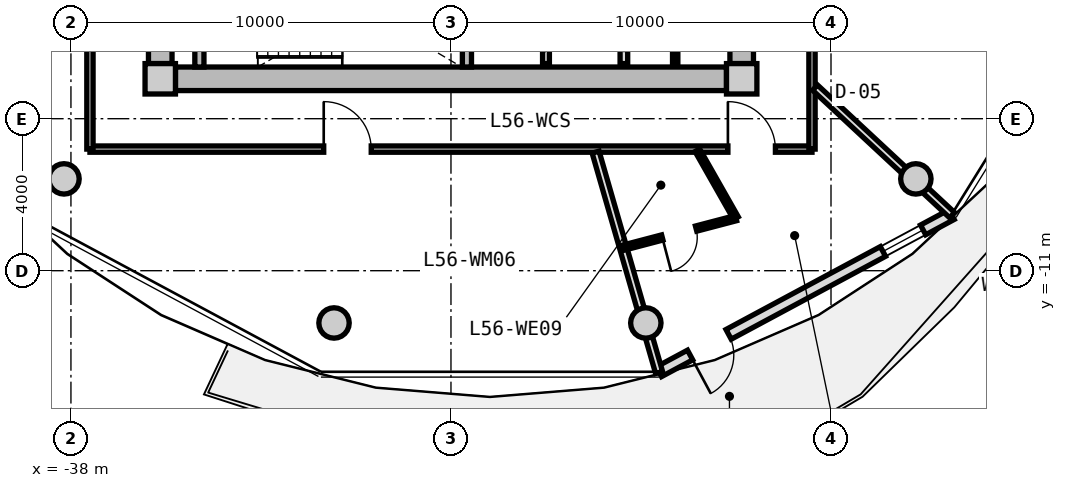
"""IFC4 building model, lengths in metres.
Left out: names, types, materials, properties, quantities, classifications, styles, units other than length and angle.
Written with IfcOpenShell. Run it as: python <this file> out.ifc"""

import sys

from ifc_helpers import new_model, si_unit, direction, frame, frame_2d, origin, origin_2d, place, context, subcontext, project, spatial, rectangle, circle, extrude, source, transform, mapped, element, fill, save


model = new_model("IFC4")
c1 = context("Model", 3, precision=1e-05, world=origin(), true_north=direction((0.0, 1.0)))
c2 = subcontext(c1, "Body", "Model", "MODEL_VIEW")
j1 = project(units=[si_unit("LENGTHUNIT", "METRE"), si_unit("PLANEANGLEUNIT", "RADIAN")], contexts=[c1])
p1 = place(None, origin())
s1 = spatial("IfcSite", under=j1, at=p1, CompositionType="ELEMENT")
p2 = place(p1, origin())
s2 = spatial("IfcBuilding", under=s1, at=p2, CompositionType="ELEMENT")
p3 = place(p2, frame((0.0, 0.0, 180.05)))
s3 = spatial("IfcBuildingStorey", under=s2, at=p3, CompositionType="ELEMENT", Elevation=180.05)
m1 = source(origin(), c2, "Body", "SweptSolid", [
    extrude(rectangle(XDim=0.8, YDim=0.8, at=origin_2d()), origin(), (0.0, 0.0, 1.0), 3.05),
])
for number, where, z_axis, x_axis in (
    (1, (-35.65, -5.95, 0.0), (0.0, 0.0, 1.0), (1.0, 0.0, 0.0)),
    (2, (-20.35, -5.95, 0.0), (0.0, 0.0, 1.0), (1.0, 0.0, 0.0)),
):
    element("IfcColumn", number, at=place(p3, frame(where, z_axis=z_axis, x_axis=x_axis)), inside=s3, PredefinedType="COLUMN", context=c2, shape_type="MappedRepresentation", body=[
        mapped(m1, transform((0.0, 0.0, 0.0), x_axis=(1.0, 0.0, 0.0), y_axis=(0.0, 1.0, 0.0), z_axis=(0.0, 0.0, 1.0), scale=1.0)),
    ])
m2 = source(origin(), c2, "Body", "SweptSolid", [
    extrude(rectangle(XDim=14.5, YDim=0.62, at=frame_2d((7.25, 0.0))), origin(), (0.0, 0.0, 1.0), 2.81),
])
p4 = place(p3, frame((-20.75, -5.95, 0.0), z_axis=(0.0, 0.0, 1.0), x_axis=(-1.0, 0.0, 0.0)))
e3 = element("IfcWall", 3, at=p4, inside=s3, PredefinedType="SHEAR", context=c2, shape_type="MappedRepresentation", body=[
    mapped(m2, transform((0.0, 0.0, 0.0), x_axis=(1.0, 0.0, 0.0), y_axis=(0.0, 1.0, 0.0), z_axis=(0.0, 0.0, 1.0), scale=1.0)),
])
m3 = source(origin(), c2, "Body", "SweptSolid", [
    extrude(rectangle(XDim=11.1, YDim=0.62, at=frame_2d((5.55, 0.0))), origin(), (0.0, 0.0, 1.0), 2.81),
])
p5 = place(p3, frame((-35.65, -5.55, 0.0), z_axis=(0.0, 0.0, 1.0), x_axis=(0.0, 1.0, 0.0)))
e4 = element("IfcWall", 4, at=p5, inside=s3, PredefinedType="SHEAR", context=c2, shape_type="MappedRepresentation", body=[
    mapped(m3, transform((0.0, 0.0, 0.0), x_axis=(1.0, 0.0, 0.0), y_axis=(0.0, 1.0, 0.0), z_axis=(0.0, 0.0, 1.0), scale=1.0)),
])
p6 = place(p5, frame((3.8, 0.0, 0.0)))
e5 = element("IfcOpeningElement", 5, at=p6, cuts=e4, PredefinedType="OPENING", context=c2, shape_type="SweptSolid", body=[
    extrude(rectangle(XDim=1.2, YDim=2.15, at=frame_2d((0.6, 1.075))), frame((0.0, 0.32, 0.0), z_axis=(0.0, -1.0, 0.0), x_axis=(1.0, 0.0, 0.0)), (0.0, 0.0, 1.0), 0.64),
])
p7 = place(p3, frame((-20.35, 5.55, 0.0), z_axis=(0.0, 0.0, 1.0), x_axis=(0.0, -1.0, 0.0)))
e6 = element("IfcWall", 6, at=p7, inside=s3, PredefinedType="SHEAR", context=c2, shape_type="MappedRepresentation", body=[
    mapped(m3, transform((0.0, 0.0, 0.0), x_axis=(1.0, 0.0, 0.0), y_axis=(0.0, 1.0, 0.0), z_axis=(0.0, 0.0, 1.0), scale=1.0)),
])
p8 = place(p7, frame((5.65, 0.0, 0.0)))
e7 = element("IfcOpeningElement", 7, at=p8, cuts=e6, PredefinedType="OPENING", context=c2, shape_type="SweptSolid", body=[
    extrude(rectangle(XDim=1.2, YDim=2.15, at=frame_2d((0.6, 1.075))), frame((0.0, 0.32, 0.0), z_axis=(0.0, -1.0, 0.0), x_axis=(1.0, 0.0, 0.0)), (0.0, 0.0, 1.0), 0.64),
])
m4 = source(origin(), c2, "Body", "SweptSolid", [
    extrude(circle(Radius=0.4, at=origin_2d()), origin(), (0.0, 0.0, 1.0), 3.05),
])
for number, where, z_axis, x_axis in (
    (8, (-38.183, -8.584, 0.0), (0.0, 0.0, 1.0), (1.0, 0.0, 0.0)),
    (9, (-31.077, -12.375, 0.0), (0.0, 0.0, 1.0), (1.0, 0.0, 0.0)),
    (10, (-22.873, -12.375, 0.0), (0.0, 0.0, 1.0), (1.0, 0.0, 0.0)),
    (11, (-15.767, -8.584, 0.0), (0.0, 0.0, 1.0), (1.0, 0.0, 0.0)),
):
    element("IfcColumn", number, at=place(p3, frame(where, z_axis=z_axis, x_axis=x_axis)), inside=s3, PredefinedType="COLUMN", context=c2, shape_type="MappedRepresentation", body=[
        mapped(m4, transform((0.0, 0.0, 0.0), x_axis=(1.0, 0.0, 0.0), y_axis=(0.0, 1.0, 0.0), z_axis=(0.0, 0.0, 1.0), scale=1.0)),
    ])
m5 = source(origin(), c2, "Body", "SweptSolid", [
    extrude(rectangle(XDim=8.742, YDim=0.29, at=frame_2d((4.371, 0.0))), origin(), (0.0, 0.0, 1.0), 2.81),
])
p9 = place(p3, frame((-14.827, -9.524, 0.0), z_axis=(0.0, 0.0, 1.0), x_axis=(-0.880998740657, -0.473118609823, 0.0)))
e12 = element("IfcWall", 12, at=p9, inside=s3, PredefinedType="SOLIDWALL", context=c2, shape_type="MappedRepresentation", body=[
    mapped(m5, transform((0.0, 0.0, 0.0), x_axis=(1.0, 0.0, 0.0), y_axis=(0.0, 1.0, 0.0), z_axis=(0.0, 0.0, 1.0), scale=1.0)),
])
p10 = place(p9, frame((6.66, 0.0, 0.0)))
e13 = element("IfcOpeningElement", 13, at=p10, cuts=e12, PredefinedType="OPENING", context=c2, shape_type="SweptSolid", body=[
    extrude(rectangle(XDim=1.15, YDim=2.25, at=frame_2d((0.575, 1.125))), frame((0.0, 0.155, 0.0), z_axis=(0.0, -1.0, 0.0), x_axis=(1.0, 0.0, 0.0)), (0.0, 0.0, 1.0), 0.31),
])
p11 = place(p9, frame((0.85, 0.0, 0.85)))
e14 = element("IfcOpeningElement", 14, at=p11, cuts=e12, PredefinedType="OPENING", context=c2, shape_type="SweptSolid", body=[
    extrude(rectangle(XDim=1.2, YDim=1.5, at=frame_2d((0.6, 0.75))), frame((0.0, 0.155, 0.0), z_axis=(0.0, -1.0, 0.0), x_axis=(1.0, 0.0, 0.0)), (0.0, 0.0, 1.0), 0.31),
])
m6 = source(origin(), c2, "Body", "SweptSolid", [
    extrude(rectangle(XDim=3.19, YDim=0.24, at=frame_2d((1.595, 0.0))), origin(), (0.0, 0.0, 1.0), 2.81),
])
for number, where, z_axis, x_axis in (
    (15, (-34.62, -5.64, 0.0), (0.0, 0.0, 1.0), (0.0, 1.0, 0.0)),
    (16, (-27.58, -5.64, 0.0), (0.0, 0.0, 1.0), (0.0, 1.0, 0.0)),
):
    element("IfcWall", number, at=place(p3, frame(where, z_axis=z_axis, x_axis=x_axis)), inside=s3, PredefinedType="PARTITIONING", context=c2, shape_type="MappedRepresentation", body=[
        mapped(m6, transform((0.0, 0.0, 0.0), x_axis=(1.0, 0.0, 0.0), y_axis=(0.0, 1.0, 0.0), z_axis=(0.0, 0.0, 1.0), scale=1.0)),
    ])
m7 = source(origin(), c2, "Body", "SweptSolid", [
    extrude(rectangle(XDim=3.8, YDim=0.2, at=frame_2d((1.9, 0.0))), origin(), (0.0, 0.0, 1.0), 2.795),
])
p12 = place(p3, frame((-23.45, -5.55, 0.0), z_axis=(0.0, 0.0, 1.0), x_axis=(0.0, 1.0, 0.0)))
e17 = element("IfcWall", 17, at=p12, inside=s3, PredefinedType="PARTITIONING", context=c2, shape_type="MappedRepresentation", body=[
    mapped(m7, transform((0.0, 0.0, 0.0), x_axis=(1.0, 0.0, 0.0), y_axis=(0.0, 1.0, 0.0), z_axis=(0.0, 0.0, 1.0), scale=1.0)),
])
m8 = source(origin(), c2, "Body", "SweptSolid", [
    extrude(rectangle(XDim=4.2, YDim=0.18, at=frame_2d((2.1, 0.0))), origin(), (0.0, 0.0, 1.0), 2.795),
])
p13 = place(p3, frame((-25.5, -5.55, 0.0), z_axis=(0.0, 0.0, 1.0), x_axis=(0.0, 1.0, 0.0)))
e18 = element("IfcWall", 18, at=p13, inside=s3, PredefinedType="PARTITIONING", context=c2, shape_type="MappedRepresentation", body=[
    mapped(m8, transform((0.0, 0.0, 0.0), x_axis=(1.0, 0.0, 0.0), y_axis=(0.0, 1.0, 0.0), z_axis=(0.0, 0.0, 1.0), scale=1.0)),
])
m9 = source(origin(), c2, "Body", "SweptSolid", [
    extrude(rectangle(XDim=3.8, YDim=0.14, at=frame_2d((1.9, 0.0))), origin(), (0.0, 0.0, 1.0), 2.795),
])
p14 = place(p3, frame((-22.1, -5.55, 0.0), z_axis=(0.0, 0.0, 1.0), x_axis=(0.0, 1.0, 0.0)))
e19 = element("IfcWall", 19, at=p14, inside=s3, PredefinedType="PARTITIONING", context=c2, shape_type="MappedRepresentation", body=[
    mapped(m9, transform((0.0, 0.0, 0.0), x_axis=(1.0, 0.0, 0.0), y_axis=(0.0, 1.0, 0.0), z_axis=(0.0, 0.0, 1.0), scale=1.0)),
])
m10 = source(origin(), c2, "Body", "SweptSolid", [
    extrude(rectangle(XDim=19.0, YDim=0.165, at=frame_2d((9.5, 0.0))), origin(), (0.0, 0.0, 1.0), 2.795),
])
p15 = place(p3, frame((-18.5, -7.8, 0.0), z_axis=(0.0, 0.0, 1.0), x_axis=(-1.0, 0.0, 0.0)))
e20 = element("IfcWall", 20, at=p15, inside=s3, PredefinedType="PARTITIONING", context=c2, shape_type="MappedRepresentation", body=[
    mapped(m10, transform((0.0, 0.0, 0.0), x_axis=(1.0, 0.0, 0.0), y_axis=(0.0, 1.0, 0.0), z_axis=(0.0, 0.0, 1.0), scale=1.0)),
])
p16 = place(p15, frame((11.598, 0.0, 0.0)))
e21 = element("IfcOpeningElement", 21, at=p16, cuts=e20, PredefinedType="OPENING", context=c2, shape_type="SweptSolid", body=[
    extrude(rectangle(XDim=1.25, YDim=2.2, at=frame_2d((0.625, 1.1))), frame((0.0, 0.093, 0.0), z_axis=(0.0, -1.0, 0.0), x_axis=(1.0, 0.0, 0.0)), (0.0, 0.0, 1.0), 0.185),
])
p17 = place(p15, frame((0.963, 0.0, 0.0)))
e22 = element("IfcOpeningElement", 22, at=p17, cuts=e20, PredefinedType="OPENING", context=c2, shape_type="SweptSolid", body=[
    extrude(rectangle(XDim=1.25, YDim=2.2, at=frame_2d((0.625, 1.1))), frame((0.0, 0.093, 0.0), z_axis=(0.0, -1.0, 0.0), x_axis=(1.0, 0.0, 0.0)), (0.0, 0.0, 1.0), 0.185),
])
m11 = source(origin(), c2, "Body", "SweptSolid", [
    extrude(rectangle(XDim=6.88, YDim=0.165, at=frame_2d((3.44, 0.0))), origin(), (0.0, 0.0, 1.0), 2.795),
])
p18 = place(p3, frame((-37.5, -7.8, 0.0), z_axis=(0.0, 0.0, 1.0), x_axis=(0.0, 1.0, 0.0)))
e23 = element("IfcWall", 23, at=p18, inside=s3, PredefinedType="PARTITIONING", context=c2, shape_type="MappedRepresentation", body=[
    mapped(m11, transform((0.0, 0.0, 0.0), x_axis=(1.0, 0.0, 0.0), y_axis=(0.0, 1.0, 0.0), z_axis=(0.0, 0.0, 1.0), scale=1.0)),
])
m12 = source(origin(), c2, "Body", "SweptSolid", [
    extrude(rectangle(XDim=7.365, YDim=0.165, at=frame_2d((3.682, 0.0))), origin(), (0.0, 0.0, 1.0), 2.795),
])
p19 = place(p3, frame((-18.5, -0.436, 0.0), z_axis=(0.0, 0.0, 1.0), x_axis=(0.0, -1.0, 0.0)))
e24 = element("IfcWall", 24, at=p19, inside=s3, PredefinedType="PARTITIONING", context=c2, shape_type="MappedRepresentation", body=[
    mapped(m12, transform((0.0, 0.0, 0.0), x_axis=(1.0, 0.0, 0.0), y_axis=(0.0, 1.0, 0.0), z_axis=(0.0, 0.0, 1.0), scale=1.0)),
])
p20 = place(p19, frame((2.433, 0.0, 0.0)))
e25 = element("IfcOpeningElement", 25, at=p20, cuts=e24, PredefinedType="OPENING", context=c2, shape_type="SweptSolid", body=[
    extrude(rectangle(XDim=1.25, YDim=2.2, at=frame_2d((0.625, 1.1))), frame((0.0, 0.093, 0.0), z_axis=(0.0, -1.0, 0.0), x_axis=(1.0, 0.0, 0.0)), (0.0, 0.0, 1.0), 0.185),
])
m13 = source(origin(), c2, "Body", "SweptSolid", [
    extrude(rectangle(XDim=6.035, YDim=0.19, at=frame_2d((3.018, 0.0))), origin(), (0.0, 0.0, 1.0), 2.345),
])
p21 = place(p3, frame((-24.194, -7.88, 0.0), z_axis=(0.0, 0.0, 1.0), x_axis=(0.276809454862, -0.960924828329, 0.0)))
e26 = element("IfcWall", 26, at=p21, inside=s3, PredefinedType="PARTITIONING", context=c2, shape_type="MappedRepresentation", body=[
    mapped(m13, transform((0.0, 0.0, 0.0), x_axis=(1.0, 0.0, 0.0), y_axis=(0.0, 1.0, 0.0), z_axis=(0.0, 0.0, 1.0), scale=1.0)),
])
m14 = source(origin(), c2, "Body", "SweptSolid", [
    extrude(rectangle(XDim=4.927, YDim=0.19, at=frame_2d((2.463, 0.0))), origin(), (0.0, 0.0, 1.0), 2.435),
])
p22 = place(p3, frame((-18.42, -6.183, 0.0), z_axis=(0.0, 0.0, 1.0), x_axis=(0.732191335987, -0.681098999783, 0.0)))
e27 = element("IfcWall", 27, at=p22, inside=s3, PredefinedType="PARTITIONING", context=c2, shape_type="MappedRepresentation", body=[
    mapped(m14, transform((0.0, 0.0, 0.0), x_axis=(1.0, 0.0, 0.0), y_axis=(0.0, 1.0, 0.0), z_axis=(0.0, 0.0, 1.0), scale=1.0)),
])
m15 = source(origin(), c2, "Body", "SweptSolid", [
    extrude(rectangle(XDim=2.055, YDim=0.14, at=frame_2d((1.027, 0.0))), origin(), (0.0, 0.0, 1.0), 2.795),
])
p23 = place(p3, frame((-21.516, -7.83, 0.0), z_axis=(0.0, 0.0, 1.0), x_axis=(0.494154336367, -0.869374195528, 0.0)))
e28 = element("IfcWall", 28, at=p23, inside=s3, PredefinedType="PARTITIONING", context=c2, shape_type="MappedRepresentation", body=[
    mapped(m15, transform((0.0, 0.0, 0.0), x_axis=(1.0, 0.0, 0.0), y_axis=(0.0, 1.0, 0.0), z_axis=(0.0, 0.0, 1.0), scale=1.0)),
])
m16 = source(origin(), c2, "Body", "SweptSolid", [
    extrude(rectangle(XDim=3.088, YDim=0.14, at=frame_2d((1.544, 0.0))), origin(), (0.0, 0.0, 1.0), 2.795),
])
p24 = place(p3, frame((-20.501, -9.616, 0.0), z_axis=(0.0, 0.0, 1.0), x_axis=(-0.967224898254, -0.253921240146, 0.0)))
e29 = element("IfcWall", 29, at=p24, inside=s3, PredefinedType="PARTITIONING", context=c2, shape_type="MappedRepresentation", body=[
    mapped(m16, transform((0.0, 0.0, 0.0), x_axis=(1.0, 0.0, 0.0), y_axis=(0.0, 1.0, 0.0), z_axis=(0.0, 0.0, 1.0), scale=1.0)),
])
p25 = place(p24, frame((1.084, 0.0, 0.0)))
e30 = element("IfcOpeningElement", 30, at=p25, cuts=e29, PredefinedType="OPENING", context=c2, shape_type="SweptSolid", body=[
    extrude(rectangle(XDim=0.92, YDim=2.1, at=frame_2d((0.46, 1.05))), frame((0.0, 0.08, 0.0), z_axis=(0.0, -1.0, 0.0), x_axis=(1.0, 0.0, 0.0)), (0.0, 0.0, 1.0), 0.16),
])
m17 = source(origin(), c2, "Body", "SweptSolid", [
    extrude(rectangle(XDim=1.15, YDim=2.25, at=frame_2d((0.575, 1.125))), frame((0.0, 0.025, 0.0), z_axis=(0.0, -1.0, 0.0), x_axis=(1.0, 0.0, 0.0)), (0.0, 0.0, 1.0), 0.05),
])
p26 = place(p10, origin())
e31 = element("IfcDoor", 31, at=p26, inside=s3, OperationType="SINGLE_SWING_RIGHT", PredefinedType="DOOR", context=c2, shape_type="MappedRepresentation", body=[
    mapped(m17, transform((0.0, 0.0, 0.0), x_axis=(1.0, 0.0, 0.0), y_axis=(0.0, 1.0, 0.0), z_axis=(0.0, 0.0, 1.0), scale=1.0)),
])
fill(e13, e31)
m18 = source(origin(), c2, "Body", "SweptSolid", [
    extrude(rectangle(XDim=1.2, YDim=1.5, at=frame_2d((0.6, 0.75))), frame((0.0, 0.03, 0.0), z_axis=(0.0, -1.0, 0.0), x_axis=(1.0, 0.0, 0.0)), (0.0, 0.0, 1.0), 0.06),
])
p27 = place(p11, origin())
e32 = element("IfcWindow", 32, at=p27, inside=s3, PartitioningType="SINGLE_PANEL", PredefinedType="WINDOW", context=c2, shape_type="MappedRepresentation", body=[
    mapped(m18, transform((0.0, 0.0, 0.0), x_axis=(1.0, 0.0, 0.0), y_axis=(0.0, 1.0, 0.0), z_axis=(0.0, 0.0, 1.0), scale=1.0)),
])
fill(e14, e32)
m19 = source(origin(), c2, "Body", "SweptSolid", [
    extrude(rectangle(XDim=1.25, YDim=2.2, at=frame_2d((0.625, 1.1))), frame((0.0, 0.025, 0.0), z_axis=(0.0, -1.0, 0.0), x_axis=(1.0, 0.0, 0.0)), (0.0, 0.0, 1.0), 0.05),
])
p28 = place(p16, frame((1.25, 0.0, 0.0), z_axis=(0.0, 0.0, 1.0), x_axis=(-1.0, 0.0, 0.0)))
e33 = element("IfcDoor", 33, at=p28, inside=s3, OperationType="SINGLE_SWING_LEFT", PredefinedType="DOOR", context=c2, shape_type="MappedRepresentation", body=[
    mapped(m19, transform((0.0, 0.0, 0.0), x_axis=(1.0, 0.0, 0.0), y_axis=(0.0, 1.0, 0.0), z_axis=(0.0, 0.0, 1.0), scale=1.0)),
])
fill(e21, e33)
p29 = place(p17, frame((1.25, 0.0, 0.0), z_axis=(0.0, 0.0, 1.0), x_axis=(-1.0, 0.0, 0.0)))
e34 = element("IfcDoor", 34, at=p29, inside=s3, OperationType="SINGLE_SWING_LEFT", PredefinedType="DOOR", context=c2, shape_type="MappedRepresentation", body=[
    mapped(m19, transform((0.0, 0.0, 0.0), x_axis=(1.0, 0.0, 0.0), y_axis=(0.0, 1.0, 0.0), z_axis=(0.0, 0.0, 1.0), scale=1.0)),
])
fill(e22, e34)
m20 = source(origin(), c2, "Body", "SweptSolid", [
    extrude(rectangle(XDim=0.92, YDim=2.1, at=frame_2d((0.46, 1.05))), frame((0.0, 0.025, 0.0), z_axis=(0.0, -1.0, 0.0), x_axis=(1.0, 0.0, 0.0)), (0.0, 0.0, 1.0), 0.05),
])
p30 = place(p25, origin())
e35 = element("IfcDoor", 35, at=p30, inside=s3, OperationType="SINGLE_SWING_RIGHT", PredefinedType="DOOR", context=c2, shape_type="MappedRepresentation", body=[
    mapped(m20, transform((0.0, 0.0, 0.0), x_axis=(1.0, 0.0, 0.0), y_axis=(0.0, 1.0, 0.0), z_axis=(0.0, 0.0, 1.0), scale=1.0)),
])
fill(e30, e35)
save(model, sys.argv[1])
